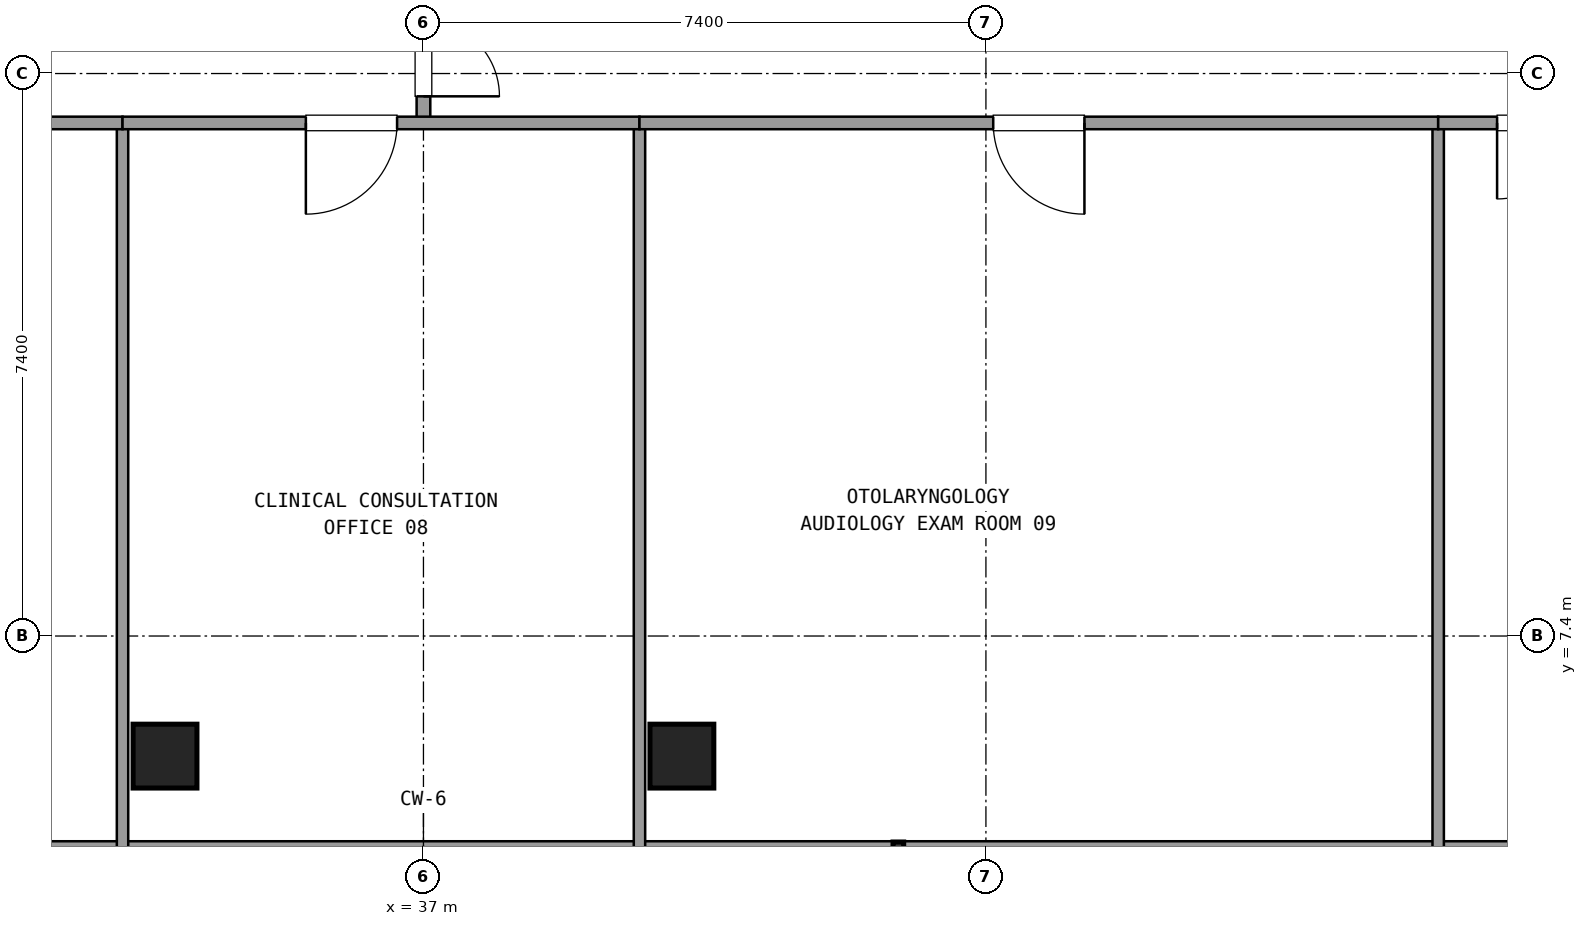
"""IFC4 building model, lengths in metres.
Left out: names, types, materials, properties, quantities, classifications, styles, units other than length and angle.
Written with IfcOpenShell. Run it as: python <this file> out.ifc"""

import sys

from ifc_helpers import new_model, si_unit, direction, frame, frame_2d, origin, origin_2d, place, context, subcontext, project, spatial, rectangle, extrude, element, fill, save


model = new_model("IFC4")
c1 = context("Model", 3, precision=1e-05, world=origin(), true_north=direction((0.0, 1.0)))
c2 = subcontext(c1, "Body", "Model", "MODEL_VIEW")
j1 = project(units=[si_unit("LENGTHUNIT", "METRE"), si_unit("PLANEANGLEUNIT", "RADIAN")], contexts=[c1])
p1 = place(None, origin())
s1 = spatial("IfcSite", under=j1, at=p1, CompositionType="ELEMENT")
p2 = place(p1, origin())
s2 = spatial("IfcBuilding", under=s1, at=p2, CompositionType="ELEMENT")
p3 = place(p2, frame((0.0, 0.0, 257.22)))
s3 = spatial("IfcBuildingStorey", under=s2, at=p3, CompositionType="ELEMENT", Elevation=257.22)
for number, where, z_axis, x_axis in (
    (1, (33.6, 5.82, 0.0), (0.0, 0.0, 1.0), (1.0, 0.0, 0.0)),
    (2, (40.4, 5.82, 0.0), (0.0, 0.0, 1.0), (1.0, 0.0, 0.0)),
):
    element("IfcColumn", number, at=place(p3, frame(where, z_axis=z_axis, x_axis=x_axis)), inside=s3, PredefinedType="COLUMN", context=c2, shape_type="SweptSolid", body=[
        extrude(rectangle(XDim=0.84, YDim=0.84, at=origin_2d()), origin(), (0.0, 0.0, 1.0), 3.6),
    ])
p4 = place(p3, frame((18.255, 4.58, 0.0), z_axis=(0.0, 0.0, 1.0), x_axis=(1.0, 0.0, 0.0)))
e3 = element("IfcWall", 3, at=p4, inside=s3, PredefinedType="SOLIDWALL", context=c2, shape_type="SweptSolid", body=[
    extrude(rectangle(XDim=37.49, YDim=0.24, at=frame_2d((18.745, 0.0))), origin(), (0.0, 0.0, 1.0), 0.85),
])
p5 = place(p3, frame((37.0, 14.15, 0.0), z_axis=(0.0, 0.0, 1.0), x_axis=(0.0, 1.0, 0.0)))
e4 = element("IfcWall", 4, at=p5, inside=s3, PredefinedType="PARTITIONING", context=c2, shape_type="SweptSolid", body=[
    extrude(rectangle(XDim=2.7, YDim=0.18, at=frame_2d((1.35, 0.0))), origin(), (0.0, 0.0, 1.0), 2.61),
])
p6 = place(p5, frame((0.35, 0.0, 0.0)))
e5 = element("IfcOpeningElement", 5, at=p6, cuts=e4, PredefinedType="OPENING", context=c2, shape_type="SweptSolid", body=[
    extrude(rectangle(XDim=2.0, YDim=2.2, at=frame_2d((1.0, 1.1))), frame((0.0, 0.1, 0.0), z_axis=(0.0, -1.0, 0.0), x_axis=(1.0, 0.0, 0.0)), (0.0, 0.0, 1.0), 0.2),
])
p7 = place(p3, frame((33.041, 14.15, 0.0), z_axis=(0.0, 0.0, 1.0), x_axis=(0.0, -1.0, 0.0)))
e6 = element("IfcWall", 6, at=p7, inside=s3, PredefinedType="PARTITIONING", context=c2, shape_type="SweptSolid", body=[
    extrude(rectangle(XDim=9.55, YDim=0.15, at=frame_2d((4.775, 0.0))), origin(), (0.0, 0.0, 1.0), 2.61),
])
p8 = place(p3, frame((23.65, 14.15, 0.0), z_axis=(0.0, 0.0, 1.0), x_axis=(1.0, 0.0, 0.0)))
e7 = element("IfcWall", 7, at=p8, inside=s3, PredefinedType="PARTITIONING", context=c2, shape_type="SweptSolid", body=[
    extrude(rectangle(XDim=9.391, YDim=0.165, at=frame_2d((4.696, 0.0))), origin(), (0.0, 0.0, 1.0), 2.61),
])
p9 = place(p8, frame((4.095, 0.0, 0.0)))
e8 = element("IfcOpeningElement", 8, at=p9, cuts=e7, PredefinedType="OPENING", context=c2, shape_type="SweptSolid", body=[
    extrude(rectangle(XDim=1.2, YDim=2.15, at=frame_2d((0.6, 1.075))), frame((0.0, 0.093, 0.0), z_axis=(0.0, -1.0, 0.0), x_axis=(1.0, 0.0, 0.0)), (0.0, 0.0, 1.0), 0.185),
])
p10 = place(p3, frame((39.842, 14.15, 0.0), z_axis=(0.0, 0.0, 1.0), x_axis=(0.0, -1.0, 0.0)))
e9 = element("IfcWall", 9, at=p10, inside=s3, PredefinedType="PARTITIONING", context=c2, shape_type="SweptSolid", body=[
    extrude(rectangle(XDim=9.55, YDim=0.15, at=frame_2d((4.775, 0.0))), origin(), (0.0, 0.0, 1.0), 2.61),
])
p11 = place(p3, frame((33.041, 14.15, 0.0), z_axis=(0.0, 0.0, 1.0), x_axis=(1.0, 0.0, 0.0)))
e10 = element("IfcWall", 10, at=p11, inside=s3, PredefinedType="PARTITIONING", context=c2, shape_type="SweptSolid", body=[
    extrude(rectangle(XDim=6.801, YDim=0.165, at=frame_2d((3.4, 0.0))), origin(), (0.0, 0.0, 1.0), 2.61),
])
p12 = place(p11, frame((2.412, 0.0, 0.0)))
e11 = element("IfcOpeningElement", 11, at=p12, cuts=e10, PredefinedType="OPENING", context=c2, shape_type="SweptSolid", body=[
    extrude(rectangle(XDim=1.2, YDim=2.15, at=frame_2d((0.6, 1.075))), frame((0.0, 0.093, 0.0), z_axis=(0.0, -1.0, 0.0), x_axis=(1.0, 0.0, 0.0)), (0.0, 0.0, 1.0), 0.185),
])
p13 = place(p3, frame((50.35, 14.15, 0.0), z_axis=(0.0, 0.0, 1.0), x_axis=(0.0, -1.0, 0.0)))
e12 = element("IfcWall", 12, at=p13, inside=s3, PredefinedType="PARTITIONING", context=c2, shape_type="SweptSolid", body=[
    extrude(rectangle(XDim=9.55, YDim=0.15, at=frame_2d((4.775, 0.0))), origin(), (0.0, 0.0, 1.0), 2.61),
])
p14 = place(p3, frame((39.842, 14.15, 0.0), z_axis=(0.0, 0.0, 1.0), x_axis=(1.0, 0.0, 0.0)))
e13 = element("IfcWall", 13, at=p14, inside=s3, PredefinedType="PARTITIONING", context=c2, shape_type="SweptSolid", body=[
    extrude(rectangle(XDim=10.508, YDim=0.165, at=frame_2d((5.254, 0.0))), origin(), (0.0, 0.0, 1.0), 2.61),
])
p15 = place(p14, frame((4.654, 0.0, 0.0)))
e14 = element("IfcOpeningElement", 14, at=p15, cuts=e13, PredefinedType="OPENING", context=c2, shape_type="SweptSolid", body=[
    extrude(rectangle(XDim=1.2, YDim=2.15, at=frame_2d((0.6, 1.075))), frame((0.0, 0.093, 0.0), z_axis=(0.0, -1.0, 0.0), x_axis=(1.0, 0.0, 0.0)), (0.0, 0.0, 1.0), 0.185),
])
p16 = place(p3, frame((50.35, 14.15, 0.0), z_axis=(0.0, 0.0, 1.0), x_axis=(1.0, 0.0, 0.0)))
e15 = element("IfcWall", 15, at=p16, inside=s3, PredefinedType="PARTITIONING", context=c2, shape_type="SweptSolid", body=[
    extrude(rectangle(XDim=2.55, YDim=0.165, at=frame_2d((1.275, 0.0))), origin(), (0.0, 0.0, 1.0), 2.61),
])
p17 = place(p16, frame((0.775, 0.0, 0.0)))
e16 = element("IfcOpeningElement", 16, at=p17, cuts=e15, PredefinedType="OPENING", context=c2, shape_type="SweptSolid", body=[
    extrude(rectangle(XDim=1.0, YDim=2.15, at=frame_2d((0.5, 1.075))), frame((0.0, 0.093, 0.0), z_axis=(0.0, -1.0, 0.0), x_axis=(1.0, 0.0, 0.0)), (0.0, 0.0, 1.0), 0.185),
])
p18 = place(p6, frame((2.0, 0.0, 0.0), z_axis=(0.0, 0.0, 1.0), x_axis=(-1.0, 0.0, 0.0)))
e17 = element("IfcDoor", 17, at=p18, inside=s3, OperationType="DOUBLE_DOOR_SINGLE_SWING", PredefinedType="DOOR", context=c2, shape_type="SweptSolid", body=[
    extrude(rectangle(XDim=2.0, YDim=2.2, at=frame_2d((1.0, 1.1))), frame((0.0, 0.025, 0.0), z_axis=(0.0, -1.0, 0.0), x_axis=(1.0, 0.0, 0.0)), (0.0, 0.0, 1.0), 0.05),
])
fill(e5, e17)
p19 = place(p12, frame((1.2, 0.0, 0.0), z_axis=(0.0, 0.0, 1.0), x_axis=(-1.0, 0.0, 0.0)))
e18 = element("IfcDoor", 18, at=p19, inside=s3, OperationType="SINGLE_SWING_LEFT", PredefinedType="DOOR", context=c2, shape_type="SweptSolid", body=[
    extrude(rectangle(XDim=1.2, YDim=2.15, at=frame_2d((0.6, 1.075))), frame((0.0, 0.025, 0.0), z_axis=(0.0, -1.0, 0.0), x_axis=(1.0, 0.0, 0.0)), (0.0, 0.0, 1.0), 0.05),
])
fill(e11, e18)
p20 = place(p15, frame((1.2, 0.0, 0.0), z_axis=(0.0, 0.0, 1.0), x_axis=(-1.0, 0.0, 0.0)))
e19 = element("IfcDoor", 19, at=p20, inside=s3, OperationType="SINGLE_SWING_RIGHT", PredefinedType="DOOR", context=c2, shape_type="SweptSolid", body=[
    extrude(rectangle(XDim=1.2, YDim=2.15, at=frame_2d((0.6, 1.075))), frame((0.0, 0.025, 0.0), z_axis=(0.0, -1.0, 0.0), x_axis=(1.0, 0.0, 0.0)), (0.0, 0.0, 1.0), 0.05),
])
fill(e14, e19)
p21 = place(p17, frame((1.0, 0.0, 0.0), z_axis=(0.0, 0.0, 1.0), x_axis=(-1.0, 0.0, 0.0)))
e20 = element("IfcDoor", 20, at=p21, inside=s3, OperationType="SINGLE_SWING_LEFT", PredefinedType="DOOR", context=c2, shape_type="SweptSolid", body=[
    extrude(rectangle(XDim=1.0, YDim=2.15, at=frame_2d((0.5, 1.075))), frame((0.0, 0.025, 0.0), z_axis=(0.0, -1.0, 0.0), x_axis=(1.0, 0.0, 0.0)), (0.0, 0.0, 1.0), 0.05),
])
fill(e16, e20)
save(model, sys.argv[1])
